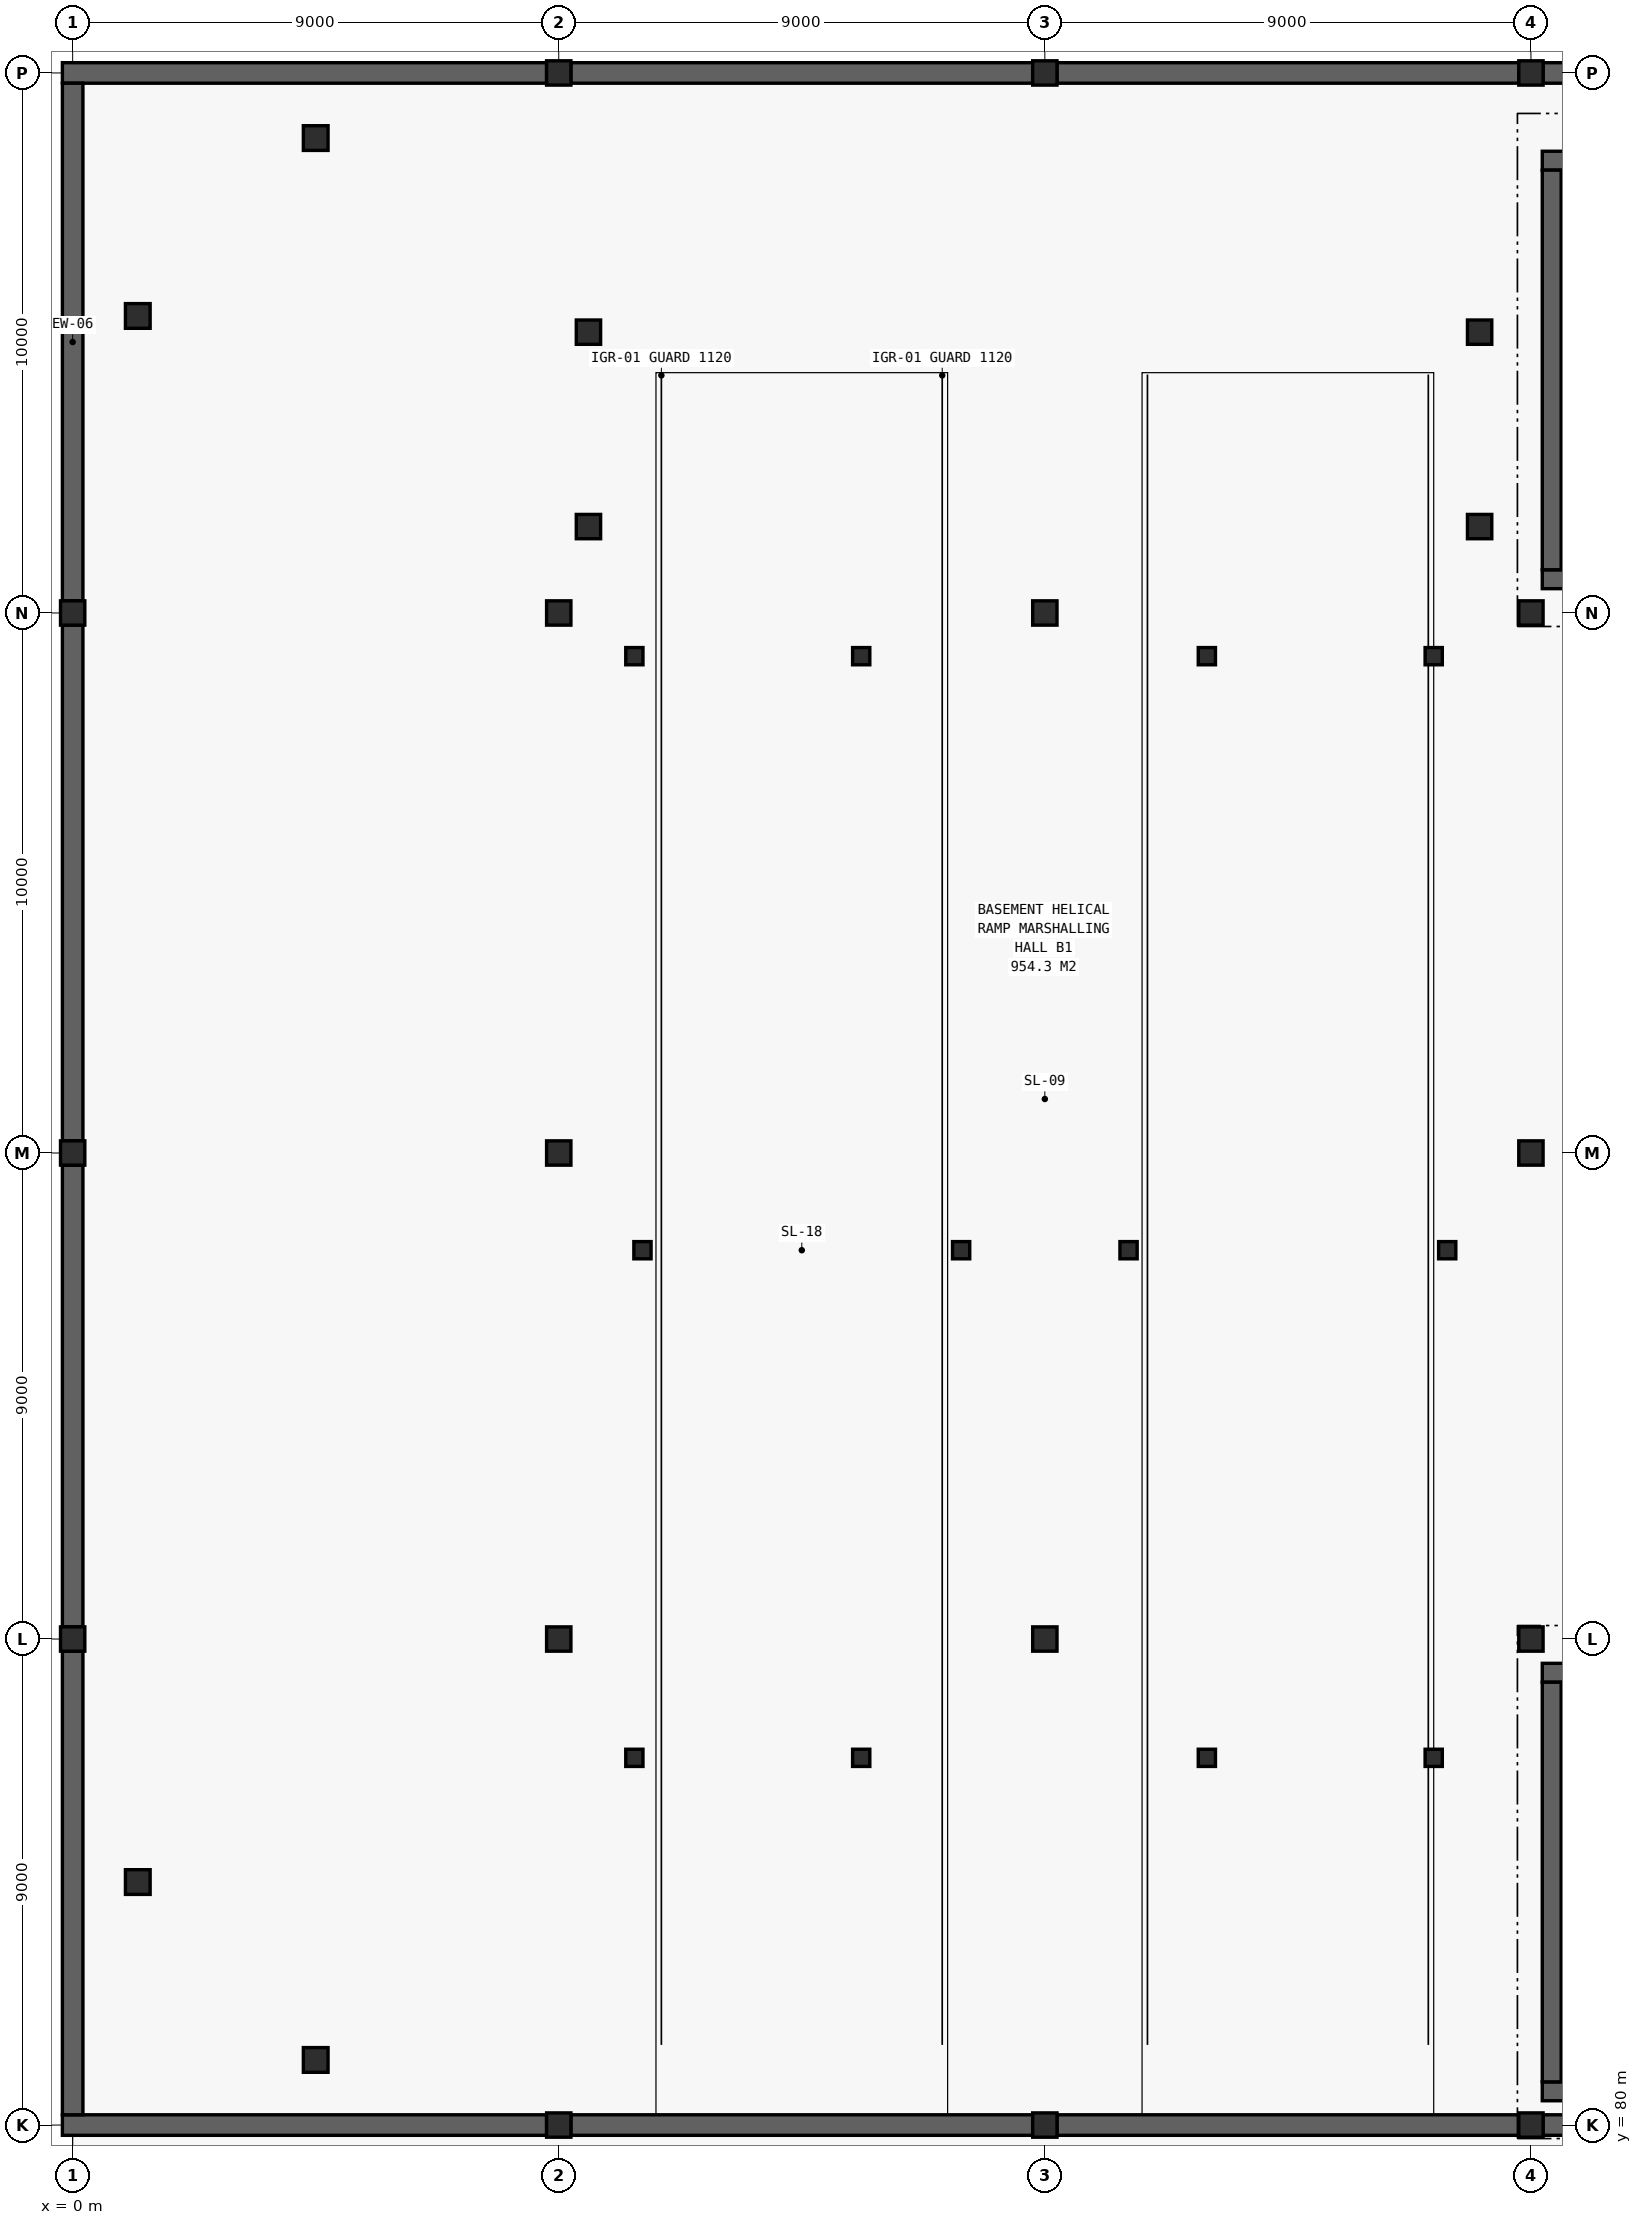
"""IFC4 building model, lengths in metres.
Left out: names, types, materials, properties, quantities, classifications, styles, units other than length and angle.
Written with IfcOpenShell. Run it as: python <this file> out.ifc"""

import sys

from ifc_helpers import new_model, si_unit, direction, frame, frame_2d, origin, origin_2d, place, context, subcontext, project, spatial, rectangle, hollow_rectangle, hollow_circle, extrude, element, save


model = new_model("IFC4")
c1 = context("Model", 3, precision=1e-05, world=origin(), true_north=direction((0.0, 1.0)))
c2 = subcontext(c1, "Body", "Model", "MODEL_VIEW")
j1 = project(units=[si_unit("LENGTHUNIT", "METRE"), si_unit("PLANEANGLEUNIT", "RADIAN")], contexts=[c1])
p1 = place(None, origin())
s1 = spatial("IfcSite", under=j1, at=p1, CompositionType="ELEMENT")
p2 = place(p1, origin())
s2 = spatial("IfcBuilding", under=s1, at=p2, CompositionType="ELEMENT")
p3 = place(p2, frame((0.0, 0.0, -4.8)))
s3 = spatial("IfcBuildingStorey", under=s2, at=p3, CompositionType="ELEMENT", Elevation=-4.8)
for number, where, z_axis, x_axis in (
    (1, (0.0, 89.0, 0.0), (0.0, 0.0, 1.0), (1.0, 0.0, 0.0)),
    (2, (0.0, 98.0, 0.0), (0.0, 0.0, 1.0), (1.0, 0.0, 0.0)),
    (3, (0.0, 108.0, 0.0), (0.0, 0.0, 1.0), (1.0, 0.0, 0.0)),
):
    element("IfcColumn", number, at=place(p3, frame(where, z_axis=z_axis, x_axis=x_axis)), inside=s3, PredefinedType="COLUMN", context=c2, shape_type="SweptSolid", body=[
        extrude(hollow_rectangle(XDim=0.45, YDim=0.45, WallThickness=0.022, at=origin_2d()), origin(), (0.0, 0.0, 1.0), 4.8),
    ])
for number, where, z_axis, x_axis in (
    (4, (1.206, 84.5, 0.0), (0.0, 0.0, 1.0), (1.0, 0.0, 0.0)),
    (5, (1.206, 113.5, 0.0), (0.0, 0.0, 1.0), (1.0, 0.0, 0.0)),
    (6, (4.5, 81.206, 0.0), (0.0, 0.0, 1.0), (1.0, 0.0, 0.0)),
    (7, (4.5, 116.794, 0.0), (0.0, 0.0, 1.0), (1.0, 0.0, 0.0)),
):
    element("IfcColumn", number, at=place(p3, frame(where, z_axis=z_axis, x_axis=x_axis)), inside=s3, PredefinedType="COLUMN", context=c2, shape_type="SweptSolid", body=[
        extrude(hollow_circle(Radius=0.229, WallThickness=0.016, at=origin_2d()), origin(), (0.0, 0.0, 1.0), 4.8),
    ])
for number, where, z_axis, x_axis in (
    (8, (9.0, 80.0, 0.0), (0.0, 0.0, 1.0), (1.0, 0.0, 0.0)),
    (9, (9.0, 89.0, 0.0), (0.0, 0.0, 1.0), (1.0, 0.0, 0.0)),
    (10, (9.0, 98.0, 0.0), (0.0, 0.0, 1.0), (1.0, 0.0, 0.0)),
    (11, (9.0, 108.0, 0.0), (0.0, 0.0, 1.0), (1.0, 0.0, 0.0)),
    (12, (9.0, 118.0, 0.0), (0.0, 0.0, 1.0), (1.0, 0.0, 0.0)),
    (13, (9.55, 109.6, 0.0), (0.0, 0.0, 1.0), (1.0, 0.0, 0.0)),
    (14, (9.55, 113.2, 0.0), (0.0, 0.0, 1.0), (1.0, 0.0, 0.0)),
):
    element("IfcColumn", number, at=place(p3, frame(where, z_axis=z_axis, x_axis=x_axis)), inside=s3, PredefinedType="COLUMN", context=c2, shape_type="SweptSolid", body=[
        extrude(hollow_rectangle(XDim=0.45, YDim=0.45, WallThickness=0.022, at=origin_2d()), origin(), (0.0, 0.0, 1.0), 4.8),
    ])
for number, where, z_axis, x_axis in (
    (15, (10.4, 86.8, 0.0), (0.0, 0.0, 1.0), (1.0, 0.0, 0.0)),
    (16, (10.4, 107.2, 0.0), (0.0, 0.0, 1.0), (1.0, 0.0, 0.0)),
):
    element("IfcColumn", number, at=place(p3, frame(where, z_axis=z_axis, x_axis=x_axis)), inside=s3, PredefinedType="COLUMN", context=c2, shape_type="SweptSolid", body=[
        extrude(hollow_circle(Radius=0.159, WallThickness=0.01, at=origin_2d()), origin(), (0.0, 0.0, 1.0), 4.8),
    ])
p4 = place(p3, frame((10.55, 96.2, 0.0), z_axis=(0.0, 0.0, 1.0), x_axis=(1.0, 0.0, 0.0)))
e17 = element("IfcColumn", 17, at=p4, inside=s3, PredefinedType="COLUMN", context=c2, shape_type="SweptSolid", body=[
    extrude(hollow_circle(Radius=0.159, WallThickness=0.01, at=origin_2d()), origin(), (0.0, 0.0, 1.0), 1.652),
])
for number, where, z_axis, x_axis in (
    (18, (14.6, 86.8, 0.0), (0.0, 0.0, 1.0), (1.0, 0.0, 0.0)),
    (19, (14.6, 107.2, 0.0), (0.0, 0.0, 1.0), (1.0, 0.0, 0.0)),
):
    element("IfcColumn", number, at=place(p3, frame(where, z_axis=z_axis, x_axis=x_axis)), inside=s3, PredefinedType="COLUMN", context=c2, shape_type="SweptSolid", body=[
        extrude(hollow_circle(Radius=0.159, WallThickness=0.01, at=origin_2d()), origin(), (0.0, 0.0, 1.0), 4.8),
    ])
p5 = place(p3, frame((16.45, 96.2, 0.0), z_axis=(0.0, 0.0, 1.0), x_axis=(1.0, 0.0, 0.0)))
e20 = element("IfcColumn", 20, at=p5, inside=s3, PredefinedType="COLUMN", context=c2, shape_type="SweptSolid", body=[
    extrude(hollow_circle(Radius=0.159, WallThickness=0.01, at=origin_2d()), origin(), (0.0, 0.0, 1.0), 1.652),
])
for number, where, z_axis, x_axis in (
    (21, (18.0, 80.0, 0.0), (0.0, 0.0, 1.0), (1.0, 0.0, 0.0)),
    (22, (18.0, 89.0, 0.0), (0.0, 0.0, 1.0), (1.0, 0.0, 0.0)),
    (23, (18.0, 108.0, 0.0), (0.0, 0.0, 1.0), (1.0, 0.0, 0.0)),
    (24, (18.0, 118.0, 0.0), (0.0, 0.0, 1.0), (1.0, 0.0, 0.0)),
):
    element("IfcColumn", number, at=place(p3, frame(where, z_axis=z_axis, x_axis=x_axis)), inside=s3, PredefinedType="COLUMN", context=c2, shape_type="SweptSolid", body=[
        extrude(hollow_rectangle(XDim=0.45, YDim=0.45, WallThickness=0.022, at=origin_2d()), origin(), (0.0, 0.0, 1.0), 4.8),
    ])
p6 = place(p3, frame((19.55, 96.2, 0.0), z_axis=(0.0, 0.0, 1.0), x_axis=(1.0, 0.0, 0.0)))
e25 = element("IfcColumn", 25, at=p6, inside=s3, PredefinedType="COLUMN", context=c2, shape_type="SweptSolid", body=[
    extrude(hollow_circle(Radius=0.159, WallThickness=0.01, at=origin_2d()), origin(), (0.0, 0.0, 1.0), 1.652),
])
for number, where, z_axis, x_axis in (
    (26, (21.0, 86.8, 0.0), (0.0, 0.0, 1.0), (1.0, 0.0, 0.0)),
    (27, (21.0, 107.2, 0.0), (0.0, 0.0, 1.0), (1.0, 0.0, 0.0)),
    (28, (25.2, 86.8, 0.0), (0.0, 0.0, 1.0), (1.0, 0.0, 0.0)),
    (29, (25.2, 107.2, 0.0), (0.0, 0.0, 1.0), (1.0, 0.0, 0.0)),
):
    element("IfcColumn", number, at=place(p3, frame(where, z_axis=z_axis, x_axis=x_axis)), inside=s3, PredefinedType="COLUMN", context=c2, shape_type="SweptSolid", body=[
        extrude(hollow_circle(Radius=0.159, WallThickness=0.01, at=origin_2d()), origin(), (0.0, 0.0, 1.0), 4.8),
    ])
p7 = place(p3, frame((25.45, 96.2, 0.0), z_axis=(0.0, 0.0, 1.0), x_axis=(1.0, 0.0, 0.0)))
e30 = element("IfcColumn", 30, at=p7, inside=s3, PredefinedType="COLUMN", context=c2, shape_type="SweptSolid", body=[
    extrude(hollow_circle(Radius=0.159, WallThickness=0.01, at=origin_2d()), origin(), (0.0, 0.0, 1.0), 1.652),
])
for number, where, z_axis, x_axis in (
    (31, (26.05, 109.6, 0.0), (0.0, 0.0, 1.0), (1.0, 0.0, 0.0)),
    (32, (26.05, 113.2, 0.0), (0.0, 0.0, 1.0), (1.0, 0.0, 0.0)),
    (33, (27.0, 80.0, 0.0), (0.0, 0.0, 1.0), (1.0, 0.0, 0.0)),
    (34, (27.0, 89.0, 0.0), (0.0, 0.0, 1.0), (1.0, 0.0, 0.0)),
    (35, (27.0, 98.0, 0.0), (0.0, 0.0, 1.0), (1.0, 0.0, 0.0)),
    (36, (27.0, 108.0, 0.0), (0.0, 0.0, 1.0), (1.0, 0.0, 0.0)),
    (37, (27.0, 118.0, 0.0), (0.0, 0.0, 1.0), (1.0, 0.0, 0.0)),
):
    element("IfcColumn", number, at=place(p3, frame(where, z_axis=z_axis, x_axis=x_axis)), inside=s3, PredefinedType="COLUMN", context=c2, shape_type="SweptSolid", body=[
        extrude(hollow_rectangle(XDim=0.45, YDim=0.45, WallThickness=0.022, at=origin_2d()), origin(), (0.0, 0.0, 1.0), 4.8),
    ])
p8 = place(p3, frame((-0.19, 80.0, 0.0), z_axis=(0.0, 0.0, 1.0), x_axis=(1.0, 0.0, 0.0)))
e38 = element("IfcWall", 38, at=p8, inside=s3, PredefinedType="USERDEFINED", context=c2, shape_type="SweptSolid", body=[
    extrude(rectangle(XDim=8.965, YDim=0.38, at=frame_2d((4.482, 0.0))), origin(), (0.0, 0.0, 1.0), 4.52),
])
for number, where, z_axis, x_axis in (
    (39, (9.225, 80.0, 0.0), (0.0, 0.0, 1.0), (1.0, 0.0, 0.0)),
    (40, (18.225, 80.0, 0.0), (0.0, 0.0, 1.0), (1.0, 0.0, 0.0)),
    (41, (27.225, 80.0, 0.0), (0.0, 0.0, 1.0), (1.0, 0.0, 0.0)),
    (42, (35.775, 118.0, 0.0), (0.0, 0.0, 1.0), (-1.0, 0.0, 0.0)),
    (43, (26.775, 118.0, 0.0), (0.0, 0.0, 1.0), (-1.0, 0.0, 0.0)),
    (44, (17.775, 118.0, 0.0), (0.0, 0.0, 1.0), (-1.0, 0.0, 0.0)),
):
    element("IfcWall", number, at=place(p3, frame(where, z_axis=z_axis, x_axis=x_axis)), inside=s3, PredefinedType="USERDEFINED", context=c2, shape_type="SweptSolid", body=[
        extrude(rectangle(XDim=8.55, YDim=0.38, at=frame_2d((4.275, 0.0))), origin(), (0.0, 0.0, 1.0), 4.13),
    ])
p9 = place(p3, frame((8.775, 118.0, 0.0), z_axis=(0.0, 0.0, 1.0), x_axis=(-1.0, 0.0, 0.0)))
e45 = element("IfcWall", 45, at=p9, inside=s3, PredefinedType="USERDEFINED", context=c2, shape_type="SweptSolid", body=[
    extrude(rectangle(XDim=8.965, YDim=0.38, at=frame_2d((4.482, 0.0))), origin(), (0.0, 0.0, 1.0), 4.52),
])
p10 = place(p3, frame((0.0, 117.81, 0.0), z_axis=(0.0, 0.0, 1.0), x_axis=(0.0, -1.0, 0.0)))
e46 = element("IfcWall", 46, at=p10, inside=s3, PredefinedType="USERDEFINED", context=c2, shape_type="SweptSolid", body=[
    extrude(rectangle(XDim=9.585, YDim=0.38, at=frame_2d((4.792, 0.0))), origin(), (0.0, 0.0, 1.0), 4.52),
])
p11 = place(p3, frame((0.0, 107.775, 0.0), z_axis=(0.0, 0.0, 1.0), x_axis=(0.0, -1.0, 0.0)))
e47 = element("IfcWall", 47, at=p11, inside=s3, PredefinedType="USERDEFINED", context=c2, shape_type="SweptSolid", body=[
    extrude(rectangle(XDim=9.55, YDim=0.38, at=frame_2d((4.775, 0.0))), origin(), (0.0, 0.0, 1.0), 4.13),
])
p12 = place(p3, frame((0.0, 97.775, 0.0), z_axis=(0.0, 0.0, 1.0), x_axis=(0.0, -1.0, 0.0)))
e48 = element("IfcWall", 48, at=p12, inside=s3, PredefinedType="USERDEFINED", context=c2, shape_type="SweptSolid", body=[
    extrude(rectangle(XDim=8.55, YDim=0.38, at=frame_2d((4.275, 0.0))), origin(), (0.0, 0.0, 1.0), 4.13),
])
p13 = place(p3, frame((0.0, 88.775, 0.0), z_axis=(0.0, 0.0, 1.0), x_axis=(0.0, -1.0, 0.0)))
e49 = element("IfcWall", 49, at=p13, inside=s3, PredefinedType="USERDEFINED", context=c2, shape_type="SweptSolid", body=[
    extrude(rectangle(XDim=8.585, YDim=0.38, at=frame_2d((4.292, 0.0))), origin(), (0.0, 0.0, 1.0), 4.52),
])
for number, where, z_axis, x_axis in (
    (50, (27.21, 80.625, 0.0), (0.0, 0.0, 1.0), (1.0, 0.0, 0.0)),
    (51, (27.21, 88.375, 0.0), (0.0, 0.0, 1.0), (1.0, 0.0, 0.0)),
):
    element("IfcWall", number, at=place(p3, frame(where, z_axis=z_axis, x_axis=x_axis)), inside=s3, PredefinedType="SHEAR", context=c2, shape_type="SweptSolid", body=[
        extrude(rectangle(XDim=3.98, YDim=0.35, at=frame_2d((1.99, 0.0))), origin(), (0.0, 0.0, 1.0), 4.52),
    ])
p14 = place(p3, frame((27.385, 80.8, 0.0), z_axis=(0.0, 0.0, 1.0), x_axis=(0.0, 1.0, 0.0)))
e52 = element("IfcWall", 52, at=p14, inside=s3, PredefinedType="SHEAR", context=c2, shape_type="SweptSolid", body=[
    extrude(rectangle(XDim=7.4, YDim=0.35, at=frame_2d((3.7, 0.0))), origin(), (0.0, 0.0, 1.0), 4.52),
])
for number, where, z_axis, x_axis in (
    (53, (27.21, 108.625, 0.0), (0.0, 0.0, 1.0), (1.0, 0.0, 0.0)),
    (54, (27.21, 116.375, 0.0), (0.0, 0.0, 1.0), (1.0, 0.0, 0.0)),
):
    element("IfcWall", number, at=place(p3, frame(where, z_axis=z_axis, x_axis=x_axis)), inside=s3, PredefinedType="SHEAR", context=c2, shape_type="SweptSolid", body=[
        extrude(rectangle(XDim=3.98, YDim=0.35, at=frame_2d((1.99, 0.0))), origin(), (0.0, 0.0, 1.0), 4.52),
    ])
p15 = place(p3, frame((27.385, 108.8, 0.0), z_axis=(0.0, 0.0, 1.0), x_axis=(0.0, 1.0, 0.0)))
e55 = element("IfcWall", 55, at=p15, inside=s3, PredefinedType="SHEAR", context=c2, shape_type="SweptSolid", body=[
    extrude(rectangle(XDim=7.4, YDim=0.35, at=frame_2d((3.7, 0.0))), origin(), (0.0, 0.0, 1.0), 4.52),
])
save(model, sys.argv[1])
